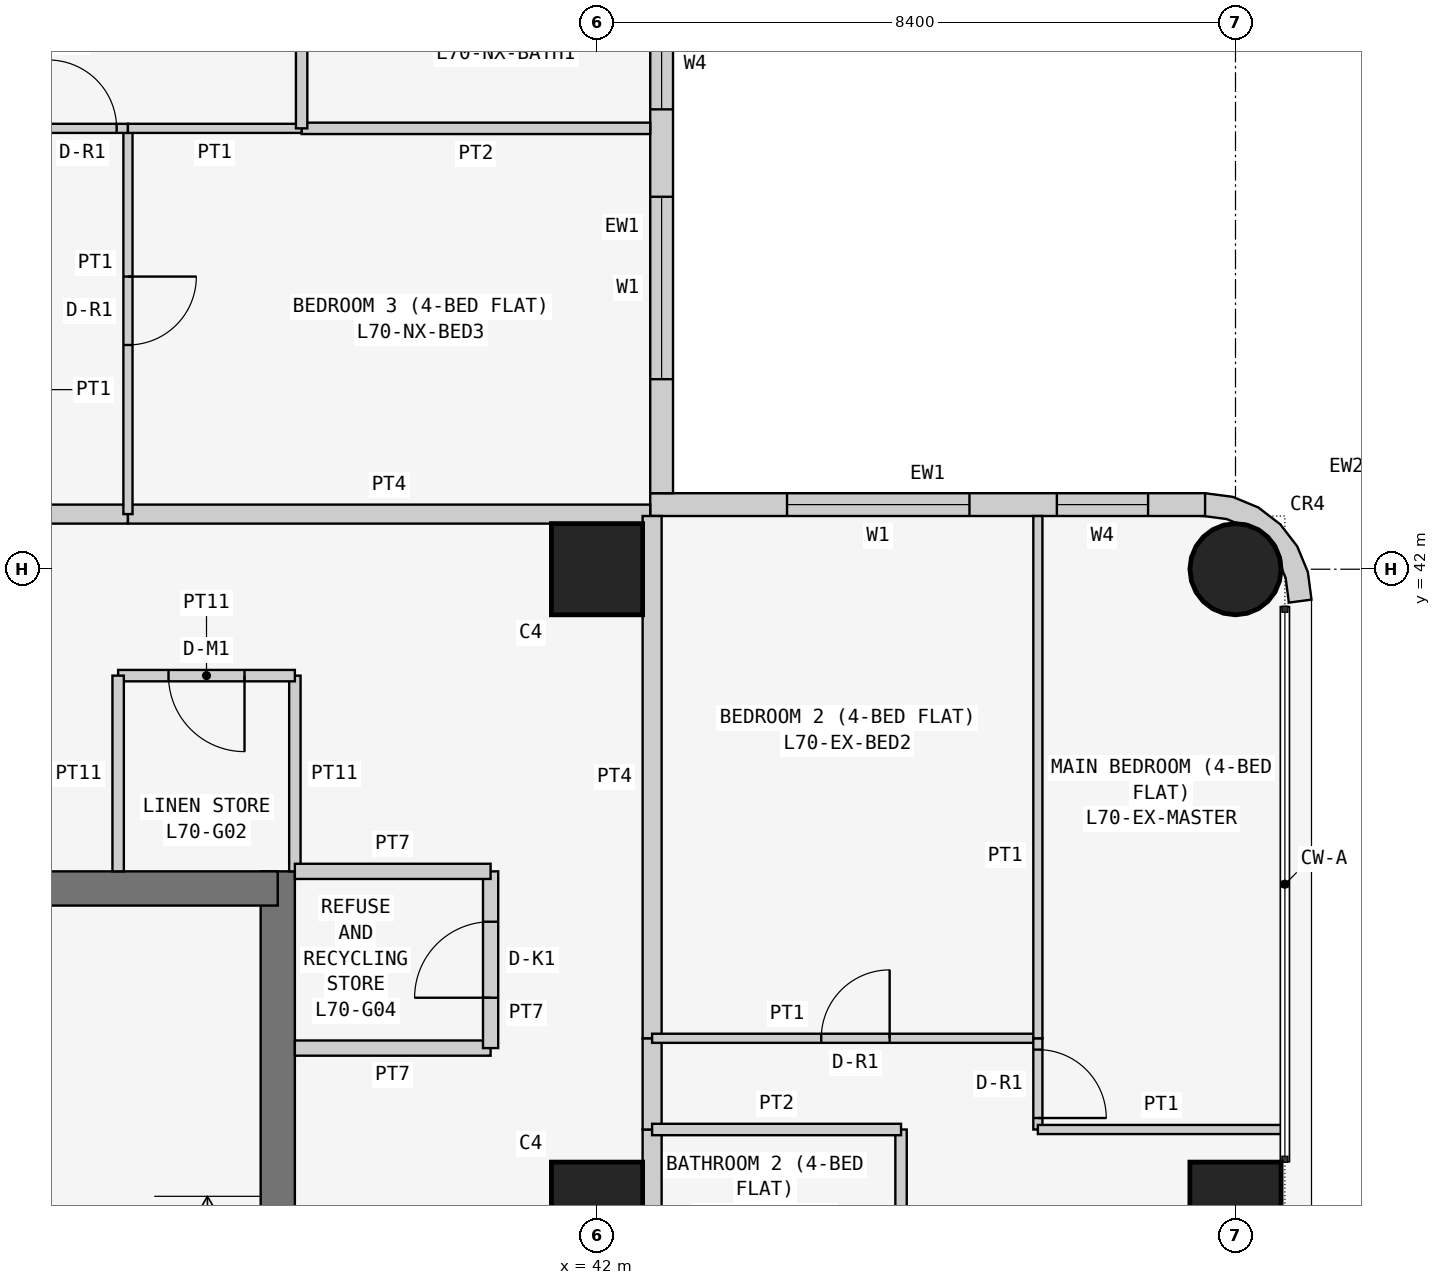
"""IFC4 building model, lengths in metres.
Left out: names, types, materials, properties, quantities, classifications, styles, units other than length and angle.
Written with IfcOpenShell. Run it as: python <this file> out.ifc"""

import sys

from ifc_helpers import new_model, si_unit, direction, frame, frame_2d, origin, origin_2d, place, context, subcontext, project, spatial, polyline, rectangle, circle, outline, extrude, element, fill, save


model = new_model("IFC4")
c1 = context("Model", 3, precision=1e-05, world=origin(), true_north=direction((0.0, 1.0)))
c2 = subcontext(c1, "Body", "Model", "MODEL_VIEW")
j1 = project(units=[si_unit("LENGTHUNIT", "METRE"), si_unit("PLANEANGLEUNIT", "RADIAN")], contexts=[c1])
p1 = place(None, origin())
s1 = spatial("IfcSite", under=j1, at=p1, CompositionType="ELEMENT")
p2 = place(p1, origin())
s2 = spatial("IfcBuilding", under=s1, at=p2, CompositionType="ELEMENT")
p3 = place(p2, frame((0.0, 0.0, 268.5)))
s3 = spatial("IfcBuildingStorey", under=s2, at=p3, CompositionType="ELEMENT", Elevation=268.5)
for number, where, z_axis, x_axis in (
    (1, (42.0, 33.6, 0.0), (0.0, 0.0, 1.0), (1.0, 0.0, 0.0)),
    (2, (42.0, 42.0, 0.0), (0.0, 0.0, 1.0), (1.0, 0.0, 0.0)),
    (3, (50.4, 33.6, 0.0), (0.0, 0.0, 1.0), (1.0, 0.0, 0.0)),
):
    element("IfcColumn", number, at=place(p3, frame(where, z_axis=z_axis, x_axis=x_axis)), inside=s3, PredefinedType="COLUMN", context=c2, shape_type="SweptSolid", body=[
        extrude(rectangle(XDim=1.2, YDim=1.2, at=origin_2d()), origin(), (0.0, 0.0, 1.0), 3.6),
    ])
p4 = place(p3, frame((50.4, 42.0, 0.0), z_axis=(0.0, 0.0, 1.0), x_axis=(1.0, 0.0, 0.0)))
e4 = element("IfcColumn", 4, at=p4, inside=s3, PredefinedType="COLUMN", context=c2, shape_type="SweptSolid", body=[
    extrude(circle(Radius=0.6, at=origin_2d()), origin(), (0.0, 0.0, 1.0), 3.6),
])
p5 = place(p3, frame((37.8, 21.0, 0.0), z_axis=(0.0, 0.0, 1.0), x_axis=(0.0, 1.0, 0.0)))
e5 = element("IfcWall", 5, at=p5, inside=s3, PredefinedType="SHEAR", context=c2, shape_type="SweptSolid", body=[
    extrude(rectangle(XDim=17.025, YDim=0.45, at=frame_2d((8.512, 0.0))), origin(), (0.0, 0.0, 1.0), 3.6),
])
p6 = place(p5, frame((5.2, 0.0, 0.0)))
e6 = element("IfcOpeningElement", 6, at=p6, cuts=e5, PredefinedType="OPENING", context=c2, shape_type="SweptSolid", body=[
    extrude(rectangle(XDim=1.2, YDim=2.1, at=frame_2d((0.6, 1.05))), frame((0.0, 0.235, 0.0), z_axis=(0.0, -1.0, 0.0), x_axis=(1.0, 0.0, 0.0)), (0.0, 0.0, 1.0), 0.47),
])
p7 = place(p3, frame((37.8, 37.8, 0.0), z_axis=(0.0, 0.0, 1.0), x_axis=(-1.0, 0.0, 0.0)))
e7 = element("IfcWall", 7, at=p7, inside=s3, PredefinedType="SHEAR", context=c2, shape_type="SweptSolid", body=[
    extrude(rectangle(XDim=17.025, YDim=0.45, at=frame_2d((8.513, 0.0))), origin(), (0.0, 0.0, 1.0), 3.6),
])
p8 = place(p3, frame((50.0, 42.85, 0.0), z_axis=(0.0, 0.0, 1.0), x_axis=(-1.0, 0.0, 0.0)))
e8 = element("IfcWall", 8, at=p8, inside=s3, PredefinedType="SOLIDWALL", context=c2, shape_type="SweptSolid", body=[
    extrude(rectangle(XDim=7.3, YDim=0.3, at=frame_2d((3.65, 0.0))), origin(), (0.0, 0.0, 1.0), 3.45),
])
p9 = place(p8, frame((3.1, 0.0, 0.9)))
e9 = element("IfcOpeningElement", 9, at=p9, cuts=e8, PredefinedType="OPENING", context=c2, shape_type="SweptSolid", body=[
    extrude(rectangle(XDim=2.4, YDim=1.5, at=frame_2d((1.2, 0.75))), frame((0.0, 0.16, 0.0), z_axis=(0.0, -1.0, 0.0), x_axis=(1.0, 0.0, 0.0)), (0.0, 0.0, 1.0), 0.32),
])
p10 = place(p8, frame((0.75, 0.0, 0.9)))
e10 = element("IfcOpeningElement", 10, at=p10, cuts=e8, PredefinedType="OPENING", context=c2, shape_type="SweptSolid", body=[
    extrude(rectangle(XDim=1.2, YDim=1.5, at=frame_2d((0.6, 0.75))), frame((0.0, 0.16, 0.0), z_axis=(0.0, -1.0, 0.0), x_axis=(1.0, 0.0, 0.0)), (0.0, 0.0, 1.0), 0.32),
])
p11 = place(p3, frame((42.85, 43.0, 0.0), z_axis=(0.0, 0.0, 1.0), x_axis=(0.0, 1.0, 0.0)))
e11 = element("IfcWall", 11, at=p11, inside=s3, PredefinedType="SOLIDWALL", context=c2, shape_type="SweptSolid", body=[
    extrude(rectangle(XDim=7.0, YDim=0.3, at=frame_2d((3.5, 0.0))), origin(), (0.0, 0.0, 1.0), 3.45),
])
p12 = place(p11, frame((1.5, 0.0, 0.9)))
e12 = element("IfcOpeningElement", 12, at=p12, cuts=e11, PredefinedType="OPENING", context=c2, shape_type="SweptSolid", body=[
    extrude(rectangle(XDim=2.4, YDim=1.5, at=frame_2d((1.2, 0.75))), frame((0.0, 0.16, 0.0), z_axis=(0.0, -1.0, 0.0), x_axis=(1.0, 0.0, 0.0)), (0.0, 0.0, 1.0), 0.32),
])
p13 = place(p11, frame((5.05, 0.0, 0.9)))
e13 = element("IfcOpeningElement", 13, at=p13, cuts=e11, PredefinedType="OPENING", context=c2, shape_type="SweptSolid", body=[
    extrude(rectangle(XDim=1.2, YDim=1.5, at=frame_2d((0.6, 0.75))), frame((0.0, 0.16, 0.0), z_axis=(0.0, -1.0, 0.0), x_axis=(1.0, 0.0, 0.0)), (0.0, 0.0, 1.0), 0.32),
])
p14 = place(p3, frame((50.976, 41.638, 0.0), z_axis=(0.0, 0.0, 1.0), x_axis=(0.707106781187, 0.707106781187, 0.0)))
e14 = element("IfcWall", 14, at=p14, inside=s3, PredefinedType="SOLIDWALL", context=c2, shape_type="SweptSolid", body=[
    extrude(outline(polyline([(0.233, 0.114), (0.047, -0.129), (0.033, -0.143), (0.273, -0.327), (0.495, -0.037), (0.635, 0.301), (0.683, 0.663), (0.635, 1.025), (0.495, 1.363), (0.273, 1.653), (0.033, 1.469), (0.047, 1.455), (0.233, 1.212), (0.292, 1.069), (0.358, 1.003), (0.449, 0.782), (0.449, 0.543), (0.358, 0.322), (0.292, 0.257), (0.233, 0.114)])), origin(), (0.0, 0.0, 1.0), 3.45),
])
p15 = place(p3, frame((38.025, 38.025, 0.0), z_axis=(0.0, 0.0, 1.0), x_axis=(0.0, 1.0, 0.0)))
e15 = element("IfcWall", 15, at=p15, inside=s3, PredefinedType="PARTITIONING", context=c2, shape_type="SweptSolid", body=[
    extrude(rectangle(XDim=2.575, YDim=0.15, at=frame_2d((1.288, 0.0))), origin(), (0.0, 0.0, 1.0), 3.45),
])
p16 = place(p3, frame((38.025, 40.6, 0.0), z_axis=(0.0, 0.0, 1.0), x_axis=(-1.0, 0.0, 0.0)))
e16 = element("IfcWall", 16, at=p16, inside=s3, PredefinedType="PARTITIONING", context=c2, shape_type="SweptSolid", body=[
    extrude(rectangle(XDim=2.325, YDim=0.15, at=frame_2d((1.163, 0.0))), origin(), (0.0, 0.0, 1.0), 3.45),
])
p17 = place(p16, frame((0.663, 0.0, 0.0)))
e17 = element("IfcOpeningElement", 17, at=p17, cuts=e16, PredefinedType="OPENING", context=c2, shape_type="SweptSolid", body=[
    extrude(rectangle(XDim=1.0, YDim=2.1, at=frame_2d((0.5, 1.05))), frame((0.0, 0.085, 0.0), z_axis=(0.0, -1.0, 0.0), x_axis=(1.0, 0.0, 0.0)), (0.0, 0.0, 1.0), 0.17),
])
p18 = place(p3, frame((35.7, 40.6, 0.0), z_axis=(0.0, 0.0, 1.0), x_axis=(0.0, -1.0, 0.0)))
e18 = element("IfcWall", 18, at=p18, inside=s3, PredefinedType="PARTITIONING", context=c2, shape_type="SweptSolid", body=[
    extrude(rectangle(XDim=2.575, YDim=0.15, at=frame_2d((1.288, 0.0))), origin(), (0.0, 0.0, 1.0), 3.45),
])
p19 = place(p3, frame((38.025, 35.7, 0.0), z_axis=(0.0, 0.0, 1.0), x_axis=(1.0, 0.0, 0.0)))
e19 = element("IfcWall", 19, at=p19, inside=s3, PredefinedType="PARTITIONING", context=c2, shape_type="SweptSolid", body=[
    extrude(rectangle(XDim=2.575, YDim=0.2, at=frame_2d((1.288, 0.0))), origin(), (0.0, 0.0, 1.0), 3.45),
])
p20 = place(p3, frame((40.6, 35.7, 0.0), z_axis=(0.0, 0.0, 1.0), x_axis=(0.0, 1.0, 0.0)))
e20 = element("IfcWall", 20, at=p20, inside=s3, PredefinedType="PARTITIONING", context=c2, shape_type="SweptSolid", body=[
    extrude(rectangle(XDim=2.325, YDim=0.2, at=frame_2d((1.163, 0.0))), origin(), (0.0, 0.0, 1.0), 3.45),
])
p21 = place(p20, frame((0.663, 0.0, 0.0)))
e21 = element("IfcOpeningElement", 21, at=p21, cuts=e20, PredefinedType="OPENING", context=c2, shape_type="SweptSolid", body=[
    extrude(rectangle(XDim=1.0, YDim=2.1, at=frame_2d((0.5, 1.05))), frame((0.0, 0.11, 0.0), z_axis=(0.0, -1.0, 0.0), x_axis=(1.0, 0.0, 0.0)), (0.0, 0.0, 1.0), 0.22),
])
p22 = place(p3, frame((40.6, 38.025, 0.0), z_axis=(0.0, 0.0, 1.0), x_axis=(-1.0, 0.0, 0.0)))
e22 = element("IfcWall", 22, at=p22, inside=s3, PredefinedType="PARTITIONING", context=c2, shape_type="SweptSolid", body=[
    extrude(rectangle(XDim=2.575, YDim=0.2, at=frame_2d((1.288, 0.0))), origin(), (0.0, 0.0, 1.0), 3.45),
])
p23 = place(p3, frame((34.629, 42.725, 0.0), z_axis=(0.0, 0.0, 1.0), x_axis=(1.0, 0.0, 0.0)))
e23 = element("IfcWall", 23, at=p23, inside=s3, PredefinedType="PARTITIONING", context=c2, shape_type="SweptSolid", body=[
    extrude(rectangle(XDim=1.2, YDim=0.25, at=frame_2d((0.6, 0.0))), origin(), (0.0, 0.0, 1.0), 3.45),
])
p24 = place(p3, frame((35.829, 42.725, 0.0), z_axis=(0.0, 0.0, 1.0), x_axis=(1.0, 0.0, 0.0)))
e24 = element("IfcWall", 24, at=p24, inside=s3, PredefinedType="PARTITIONING", context=c2, shape_type="SweptSolid", body=[
    extrude(rectangle(XDim=6.871, YDim=0.25, at=frame_2d((3.436, 0.0))), origin(), (0.0, 0.0, 1.0), 3.45),
])
p25 = place(p3, frame((42.725, 34.629, 0.0), z_axis=(0.0, 0.0, 1.0), x_axis=(0.0, -1.0, 0.0)))
e25 = element("IfcWall", 25, at=p25, inside=s3, PredefinedType="PARTITIONING", context=c2, shape_type="SweptSolid", body=[
    extrude(rectangle(XDim=2.629, YDim=0.25, at=frame_2d((1.314, 0.0))), origin(), (0.0, 0.0, 1.0), 3.45),
])
p26 = place(p3, frame((42.725, 35.829, 0.0), z_axis=(0.0, 0.0, 1.0), x_axis=(0.0, -1.0, 0.0)))
e26 = element("IfcWall", 26, at=p26, inside=s3, PredefinedType="PARTITIONING", context=c2, shape_type="SweptSolid", body=[
    extrude(rectangle(XDim=1.2, YDim=0.25, at=frame_2d((0.6, 0.0))), origin(), (0.0, 0.0, 1.0), 3.45),
])
p27 = place(p3, frame((42.725, 42.7, 0.0), z_axis=(0.0, 0.0, 1.0), x_axis=(0.0, -1.0, 0.0)))
e27 = element("IfcWall", 27, at=p27, inside=s3, PredefinedType="PARTITIONING", context=c2, shape_type="SweptSolid", body=[
    extrude(rectangle(XDim=6.871, YDim=0.25, at=frame_2d((3.436, 0.0))), origin(), (0.0, 0.0, 1.0), 3.45),
])
p28 = place(p3, frame((35.829, 47.8, 0.0), z_axis=(0.0, 0.0, 1.0), x_axis=(0.0, -1.0, 0.0)))
e28 = element("IfcWall", 28, at=p28, inside=s3, PredefinedType="PARTITIONING", context=c2, shape_type="SweptSolid", body=[
    extrude(rectangle(XDim=5.075, YDim=0.12, at=frame_2d((2.538, 0.0))), origin(), (0.0, 0.0, 1.0), 3.45),
])
p29 = place(p28, frame((1.95, 0.0, 0.0)))
e29 = element("IfcOpeningElement", 29, at=p29, cuts=e28, PredefinedType="OPENING", context=c2, shape_type="SweptSolid", body=[
    extrude(rectangle(XDim=0.9, YDim=2.1, at=frame_2d((0.45, 1.05))), frame((0.0, 0.07, 0.0), z_axis=(0.0, -1.0, 0.0), x_axis=(1.0, 0.0, 0.0)), (0.0, 0.0, 1.0), 0.14),
])
p30 = place(p3, frame((34.629, 47.8, 0.0), z_axis=(0.0, 0.0, 1.0), x_axis=(1.0, 0.0, 0.0)))
e30 = element("IfcWall", 30, at=p30, inside=s3, PredefinedType="PARTITIONING", context=c2, shape_type="SweptSolid", body=[
    extrude(rectangle(XDim=1.2, YDim=0.12, at=frame_2d((0.6, 0.0))), origin(), (0.0, 0.0, 1.0), 3.45),
])
p31 = place(p30, frame((0.151, 0.0, 0.0)))
e31 = element("IfcOpeningElement", 31, at=p31, cuts=e30, PredefinedType="OPENING", context=c2, shape_type="SweptSolid", body=[
    extrude(rectangle(XDim=0.9, YDim=2.1, at=frame_2d((0.45, 1.05))), frame((0.0, 0.07, 0.0), z_axis=(0.0, -1.0, 0.0), x_axis=(1.0, 0.0, 0.0)), (0.0, 0.0, 1.0), 0.14),
])
p32 = place(p3, frame((42.7, 47.8, 0.0), z_axis=(0.0, 0.0, 1.0), x_axis=(-1.0, 0.0, 0.0)))
e32 = element("IfcWall", 32, at=p32, inside=s3, PredefinedType="PARTITIONING", context=c2, shape_type="SweptSolid", body=[
    extrude(rectangle(XDim=4.586, YDim=0.15, at=frame_2d((2.293, 0.0))), origin(), (0.0, 0.0, 1.0), 3.45),
])
p33 = place(p3, frame((38.114, 47.8, 0.0), z_axis=(0.0, 0.0, 1.0), x_axis=(-1.0, 0.0, 0.0)))
e33 = element("IfcWall", 33, at=p33, inside=s3, PredefinedType="PARTITIONING", context=c2, shape_type="SweptSolid", body=[
    extrude(rectangle(XDim=2.285, YDim=0.12, at=frame_2d((1.143, 0.0))), origin(), (0.0, 0.0, 1.0), 3.45),
])
p34 = place(p3, frame((38.114, 51.05, 0.0), z_axis=(0.0, 0.0, 1.0), x_axis=(0.0, -1.0, 0.0)))
e34 = element("IfcWall", 34, at=p34, inside=s3, PredefinedType="PARTITIONING", context=c2, shape_type="SweptSolid", body=[
    extrude(rectangle(XDim=3.25, YDim=0.15, at=frame_2d((1.625, 0.0))), origin(), (0.0, 0.0, 1.0), 3.45),
])
p35 = place(p34, frame((1.25, 0.0, 0.0)))
e35 = element("IfcOpeningElement", 35, at=p35, cuts=e34, PredefinedType="OPENING", context=c2, shape_type="SweptSolid", body=[
    extrude(rectangle(XDim=0.8, YDim=2.1, at=frame_2d((0.4, 1.05))), frame((0.0, 0.085, 0.0), z_axis=(0.0, -1.0, 0.0), x_axis=(1.0, 0.0, 0.0)), (0.0, 0.0, 1.0), 0.17),
])
p36 = place(p3, frame((46.0, 32.0, 0.0), z_axis=(0.0, 0.0, 1.0), x_axis=(0.0, 1.0, 0.0)))
e36 = element("IfcWall", 36, at=p36, inside=s3, PredefinedType="PARTITIONING", context=c2, shape_type="SweptSolid", body=[
    extrude(rectangle(XDim=2.629, YDim=0.15, at=frame_2d((1.314, 0.0))), origin(), (0.0, 0.0, 1.0), 3.45),
])
p37 = place(p3, frame((46.0, 34.629, 0.0), z_axis=(0.0, 0.0, 1.0), x_axis=(-1.0, 0.0, 0.0)))
e37 = element("IfcWall", 37, at=p37, inside=s3, PredefinedType="PARTITIONING", context=c2, shape_type="SweptSolid", body=[
    extrude(rectangle(XDim=3.275, YDim=0.15, at=frame_2d((1.637, 0.0))), origin(), (0.0, 0.0, 1.0), 3.45),
])
p38 = place(p3, frame((42.725, 35.829, 0.0), z_axis=(0.0, 0.0, 1.0), x_axis=(1.0, 0.0, 0.0)))
e38 = element("IfcWall", 38, at=p38, inside=s3, PredefinedType="PARTITIONING", context=c2, shape_type="SweptSolid", body=[
    extrude(rectangle(XDim=5.075, YDim=0.12, at=frame_2d((2.538, 0.0))), origin(), (0.0, 0.0, 1.0), 3.45),
])
p39 = place(p38, frame((2.225, 0.0, 0.0)))
e39 = element("IfcOpeningElement", 39, at=p39, cuts=e38, PredefinedType="OPENING", context=c2, shape_type="SweptSolid", body=[
    extrude(rectangle(XDim=0.9, YDim=2.1, at=frame_2d((0.45, 1.05))), frame((0.0, 0.07, 0.0), z_axis=(0.0, -1.0, 0.0), x_axis=(1.0, 0.0, 0.0)), (0.0, 0.0, 1.0), 0.14),
])
p40 = place(p3, frame((47.8, 35.829, 0.0), z_axis=(0.0, 0.0, 1.0), x_axis=(0.0, -1.0, 0.0)))
e40 = element("IfcWall", 40, at=p40, inside=s3, PredefinedType="PARTITIONING", context=c2, shape_type="SweptSolid", body=[
    extrude(rectangle(XDim=1.2, YDim=0.12, at=frame_2d((0.6, 0.0))), origin(), (0.0, 0.0, 1.0), 3.45),
])
p41 = place(p40, frame((0.149, 0.0, 0.0)))
e41 = element("IfcOpeningElement", 41, at=p41, cuts=e40, PredefinedType="OPENING", context=c2, shape_type="SweptSolid", body=[
    extrude(rectangle(XDim=0.9, YDim=2.1, at=frame_2d((0.45, 1.05))), frame((0.0, 0.07, 0.0), z_axis=(0.0, -1.0, 0.0), x_axis=(1.0, 0.0, 0.0)), (0.0, 0.0, 1.0), 0.14),
])
p42 = place(p3, frame((47.8, 34.629, 0.0), z_axis=(0.0, 0.0, 1.0), x_axis=(1.0, 0.0, 0.0)))
e42 = element("IfcWall", 42, at=p42, inside=s3, PredefinedType="PARTITIONING", context=c2, shape_type="SweptSolid", body=[
    extrude(rectangle(XDim=3.25, YDim=0.12, at=frame_2d((1.625, 0.0))), origin(), (0.0, 0.0, 1.0), 3.45),
])
p43 = place(p3, frame((47.8, 35.829, 0.0), z_axis=(0.0, 0.0, 1.0), x_axis=(0.0, 1.0, 0.0)))
e43 = element("IfcWall", 43, at=p43, inside=s3, PredefinedType="PARTITIONING", context=c2, shape_type="SweptSolid", body=[
    extrude(rectangle(XDim=6.871, YDim=0.12, at=frame_2d((3.436, 0.0))), origin(), (0.0, 0.0, 1.0), 3.45),
])
p44 = place(p12, origin())
e44 = element("IfcWindow", 44, at=p44, inside=s3, PartitioningType="SINGLE_PANEL", PredefinedType="WINDOW", context=c2, shape_type="SweptSolid", body=[
    extrude(rectangle(XDim=2.4, YDim=1.5, at=frame_2d((1.2, 0.75))), frame((0.0, 0.03, 0.0), z_axis=(0.0, -1.0, 0.0), x_axis=(1.0, 0.0, 0.0)), (0.0, 0.0, 1.0), 0.06),
])
fill(e12, e44)
p45 = place(p13, origin())
e45 = element("IfcWindow", 45, at=p45, inside=s3, PartitioningType="SINGLE_PANEL", PredefinedType="WINDOW", context=c2, shape_type="SweptSolid", body=[
    extrude(rectangle(XDim=1.2, YDim=1.5, at=frame_2d((0.6, 0.75))), frame((0.0, 0.03, 0.0), z_axis=(0.0, -1.0, 0.0), x_axis=(1.0, 0.0, 0.0)), (0.0, 0.0, 1.0), 0.06),
])
fill(e13, e45)
p46 = place(p9, origin())
e46 = element("IfcWindow", 46, at=p46, inside=s3, PartitioningType="SINGLE_PANEL", PredefinedType="WINDOW", context=c2, shape_type="SweptSolid", body=[
    extrude(rectangle(XDim=2.4, YDim=1.5, at=frame_2d((1.2, 0.75))), frame((0.0, 0.03, 0.0), z_axis=(0.0, -1.0, 0.0), x_axis=(1.0, 0.0, 0.0)), (0.0, 0.0, 1.0), 0.06),
])
fill(e9, e46)
p47 = place(p10, origin())
e47 = element("IfcWindow", 47, at=p47, inside=s3, PartitioningType="SINGLE_PANEL", PredefinedType="WINDOW", context=c2, shape_type="SweptSolid", body=[
    extrude(rectangle(XDim=1.2, YDim=1.5, at=frame_2d((0.6, 0.75))), frame((0.0, 0.03, 0.0), z_axis=(0.0, -1.0, 0.0), x_axis=(1.0, 0.0, 0.0)), (0.0, 0.0, 1.0), 0.06),
])
fill(e10, e47)
p48 = place(p17, origin())
e48 = element("IfcDoor", 48, at=p48, inside=s3, OperationType="SINGLE_SWING_LEFT", PredefinedType="DOOR", context=c2, shape_type="SweptSolid", body=[
    extrude(rectangle(XDim=1.0, YDim=2.1, at=frame_2d((0.5, 1.05))), frame((0.0, 0.025, 0.0), z_axis=(0.0, -1.0, 0.0), x_axis=(1.0, 0.0, 0.0)), (0.0, 0.0, 1.0), 0.05),
])
fill(e17, e48)
p49 = place(p21, origin())
e49 = element("IfcDoor", 49, at=p49, inside=s3, OperationType="SINGLE_SWING_LEFT", PredefinedType="DOOR", context=c2, shape_type="SweptSolid", body=[
    extrude(rectangle(XDim=1.0, YDim=2.1, at=frame_2d((0.5, 1.05))), frame((0.0, 0.025, 0.0), z_axis=(0.0, -1.0, 0.0), x_axis=(1.0, 0.0, 0.0)), (0.0, 0.0, 1.0), 0.05),
])
fill(e21, e49)
p50 = place(p29, origin())
e50 = element("IfcDoor", 50, at=p50, inside=s3, OperationType="SINGLE_SWING_LEFT", PredefinedType="DOOR", context=c2, shape_type="SweptSolid", body=[
    extrude(rectangle(XDim=0.9, YDim=2.1, at=frame_2d((0.45, 1.05))), frame((0.0, 0.025, 0.0), z_axis=(0.0, -1.0, 0.0), x_axis=(1.0, 0.0, 0.0)), (0.0, 0.0, 1.0), 0.05),
])
fill(e29, e50)
p51 = place(p31, origin())
e51 = element("IfcDoor", 51, at=p51, inside=s3, OperationType="SINGLE_SWING_LEFT", PredefinedType="DOOR", context=c2, shape_type="SweptSolid", body=[
    extrude(rectangle(XDim=0.9, YDim=2.1, at=frame_2d((0.45, 1.05))), frame((0.0, 0.025, 0.0), z_axis=(0.0, -1.0, 0.0), x_axis=(1.0, 0.0, 0.0)), (0.0, 0.0, 1.0), 0.05),
])
fill(e31, e51)
p52 = place(p39, origin())
e52 = element("IfcDoor", 52, at=p52, inside=s3, OperationType="SINGLE_SWING_RIGHT", PredefinedType="DOOR", context=c2, shape_type="SweptSolid", body=[
    extrude(rectangle(XDim=0.9, YDim=2.1, at=frame_2d((0.45, 1.05))), frame((0.0, 0.025, 0.0), z_axis=(0.0, -1.0, 0.0), x_axis=(1.0, 0.0, 0.0)), (0.0, 0.0, 1.0), 0.05),
])
fill(e39, e52)
p53 = place(p41, origin())
e53 = element("IfcDoor", 53, at=p53, inside=s3, OperationType="SINGLE_SWING_RIGHT", PredefinedType="DOOR", context=c2, shape_type="SweptSolid", body=[
    extrude(rectangle(XDim=0.9, YDim=2.1, at=frame_2d((0.45, 1.05))), frame((0.0, 0.025, 0.0), z_axis=(0.0, -1.0, 0.0), x_axis=(1.0, 0.0, 0.0)), (0.0, 0.0, 1.0), 0.05),
])
fill(e41, e53)
save(model, sys.argv[1])
